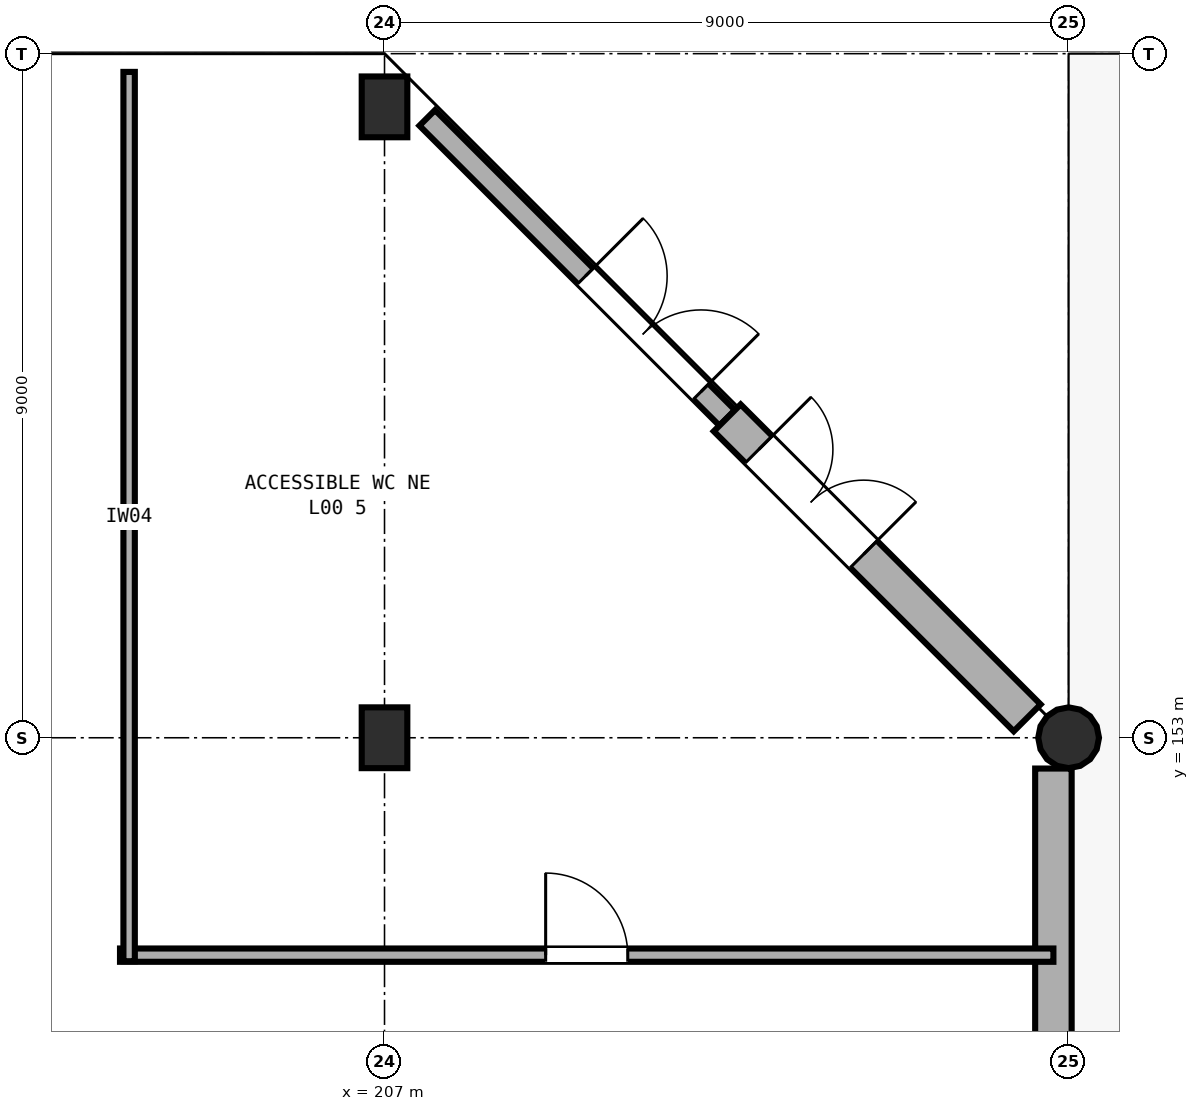
"""IFC4 building model, lengths in metres.
Left out: names, types, materials, properties, quantities, classifications, styles, units other than length and angle.
Written with IfcOpenShell. Run it as: python <this file> out.ifc"""

import sys

from ifc_helpers import new_model, si_unit, direction, frame, frame_2d, origin, origin_2d, place, context, subcontext, project, spatial, rectangle, circle, extrude, element, fill, save


model = new_model("IFC4")
c1 = context("Model", 3, precision=1e-05, world=origin(), true_north=direction((0.0, 1.0)))
c2 = subcontext(c1, "Body", "Model", "MODEL_VIEW")
j1 = project(units=[si_unit("LENGTHUNIT", "METRE"), si_unit("PLANEANGLEUNIT", "RADIAN")], contexts=[c1])
p1 = place(None, origin())
s1 = spatial("IfcSite", under=j1, at=p1, CompositionType="ELEMENT")
p2 = place(p1, origin())
s2 = spatial("IfcBuilding", under=s1, at=p2, CompositionType="ELEMENT")
p3 = place(p2, origin())
s3 = spatial("IfcBuildingStorey", under=s2, at=p3, CompositionType="ELEMENT", Elevation=0.0)
for number, where, z_axis, x_axis in (
    (1, (207.0, 153.0, 0.0), (0.0, 0.0, 1.0), (1.0, 0.0, 0.0)),
    (2, (207.0, 161.3, 0.0), (0.0, 0.0, 1.0), (1.0, 0.0, 0.0)),
):
    element("IfcColumn", number, at=place(p3, frame(where, z_axis=z_axis, x_axis=x_axis)), inside=s3, PredefinedType="COLUMN", context=c2, shape_type="SweptSolid", body=[
        extrude(rectangle(XDim=0.6, YDim=0.8, at=origin_2d()), origin(), (0.0, 0.0, 1.0), 4.8),
    ])
p4 = place(p3, frame((216.0, 153.0, 0.0), z_axis=(0.0, 0.0, 1.0), x_axis=(1.0, 0.0, 0.0)))
e3 = element("IfcColumn", 3, at=p4, inside=s3, PredefinedType="COLUMN", context=c2, shape_type="SweptSolid", body=[
    extrude(circle(Radius=0.4, at=origin_2d()), origin(), (0.0, 0.0, 1.0), 4.8),
])
p5 = place(p3, frame((198.305, 161.8, 0.0), z_axis=(0.0, 0.0, 1.0), x_axis=(1.0, 0.0, 0.0)))
e4 = element("IfcWall", 4, at=p5, inside=s3, PredefinedType="SOLIDWALL", context=c2, shape_type="SweptSolid", body=[
    extrude(rectangle(XDim=8.39, YDim=0.31, at=frame_2d((4.195, 0.0))), origin(), (0.0, 0.0, 1.0), 3.58),
])
p6 = place(p3, frame((207.562, 161.155, 0.0), z_axis=(0.0, 0.0, 1.0), x_axis=(0.7071067811865476, -0.7071067811865476, 0.0)))
e5 = element("IfcWall", 5, at=p6, inside=s3, PredefinedType="SOLIDWALL", context=c2, shape_type="SweptSolid", body=[
    extrude(rectangle(XDim=5.581, YDim=0.29, at=frame_2d((2.791, 0.0))), origin(), (0.0, 0.0, 1.0), 3.58),
])
p7 = place(p6, frame((2.943, 0.0, 0.0)))
e6 = element("IfcOpeningElement", 6, at=p7, cuts=e5, PredefinedType="OPENING", context=c2, shape_type="SweptSolid", body=[
    extrude(rectangle(XDim=2.15, YDim=2.1, at=frame_2d((1.075, 1.05))), frame((0.0, 0.155, 0.0), z_axis=(0.0, -1.0, 0.0), x_axis=(1.0, 0.0, 0.0)), (0.0, 0.0, 1.0), 0.31),
])
p8 = place(p3, frame((211.509, 157.208, 0.0), z_axis=(0.0, 0.0, 1.0), x_axis=(0.7071286530614815, -0.7070849086350626, 0.0)))
e7 = element("IfcWall", 7, at=p8, inside=s3, PredefinedType="SOLIDWALL", context=c2, shape_type="SweptSolid", body=[
    extrude(rectangle(XDim=5.581, YDim=0.5, at=frame_2d((2.791, 0.0))), origin(), (0.0, 0.0, 1.0), 3.58),
])
p9 = place(p8, frame((0.588, 0.0, 0.0)))
e8 = element("IfcOpeningElement", 8, at=p9, cuts=e7, PredefinedType="OPENING", context=c2, shape_type="SweptSolid", body=[
    extrude(rectangle(XDim=1.95, YDim=2.1, at=frame_2d((0.975, 1.05))), frame((0.0, 0.26, 0.0), z_axis=(0.0, -1.0, 0.0), x_axis=(1.0, 0.0, 0.0)), (0.0, 0.0, 1.0), 0.52),
])
p10 = place(p3, frame((215.8, 152.595, 0.0), z_axis=(0.0, 0.0, 1.0), x_axis=(0.0, -1.0, 0.0)))
e9 = element("IfcWall", 9, at=p10, inside=s3, PredefinedType="SOLIDWALL", context=c2, shape_type="SweptSolid", body=[
    extrude(rectangle(XDim=8.19, YDim=0.48, at=frame_2d((4.095, 0.0))), origin(), (0.0, 0.0, 1.0), 3.58),
])
p11 = place(p3, frame((203.52, 150.14, 0.0), z_axis=(0.0, 0.0, 1.0), x_axis=(1.0, 0.0, 0.0)))
e10 = element("IfcWall", 10, at=p11, inside=s3, PredefinedType="PARTITIONING", context=c2, shape_type="SweptSolid", body=[
    extrude(rectangle(XDim=12.28, YDim=0.175, at=frame_2d((6.14, 0.0))), origin(), (0.0, 0.0, 1.0), 3.28),
])
p12 = place(p11, frame((5.6, 0.0, 0.0)))
e11 = element("IfcOpeningElement", 11, at=p12, cuts=e10, PredefinedType="OPENING", context=c2, shape_type="SweptSolid", body=[
    extrude(rectangle(XDim=1.08, YDim=2.18, at=frame_2d((0.54, 1.09))), frame((0.0, 0.097, 0.0), z_axis=(0.0, -1.0, 0.0), x_axis=(1.0, 0.0, 0.0)), (0.0, 0.0, 1.0), 0.195),
])
p13 = place(p3, frame((203.64, 150.06, 0.0), z_axis=(0.0, 0.0, 1.0), x_axis=(0.0, 1.0, 0.0)))
e12 = element("IfcWall", 12, at=p13, inside=s3, PredefinedType="PARTITIONING", context=c2, shape_type="SweptSolid", body=[
    extrude(rectangle(XDim=11.7, YDim=0.15, at=frame_2d((5.85, 0.0))), origin(), (0.0, 0.0, 1.0), 3.28),
])
p14 = place(p7, origin())
e13 = element("IfcDoor", 13, at=p14, inside=s3, OperationType="DOUBLE_DOOR_SINGLE_SWING", PredefinedType="GATE", context=c2, shape_type="SweptSolid", body=[
    extrude(rectangle(XDim=2.15, YDim=2.1, at=frame_2d((1.075, 1.05))), frame((0.0, 0.025, 0.0), z_axis=(0.0, -1.0, 0.0), x_axis=(1.0, 0.0, 0.0)), (0.0, 0.0, 1.0), 0.05),
])
fill(e6, e13)
p15 = place(p9, origin())
e14 = element("IfcDoor", 14, at=p15, inside=s3, OperationType="DOUBLE_DOOR_SINGLE_SWING", PredefinedType="GATE", context=c2, shape_type="SweptSolid", body=[
    extrude(rectangle(XDim=1.95, YDim=2.1, at=frame_2d((0.975, 1.05))), frame((0.0, 0.025, 0.0), z_axis=(0.0, -1.0, 0.0), x_axis=(1.0, 0.0, 0.0)), (0.0, 0.0, 1.0), 0.05),
])
fill(e8, e14)
p16 = place(p12, origin())
e15 = element("IfcDoor", 15, at=p16, inside=s3, OperationType="SINGLE_SWING_LEFT", PredefinedType="DOOR", context=c2, shape_type="SweptSolid", body=[
    extrude(rectangle(XDim=1.08, YDim=2.18, at=frame_2d((0.54, 1.09))), frame((0.0, 0.025, 0.0), z_axis=(0.0, -1.0, 0.0), x_axis=(1.0, 0.0, 0.0)), (0.0, 0.0, 1.0), 0.05),
])
fill(e11, e15)
save(model, sys.argv[1])
